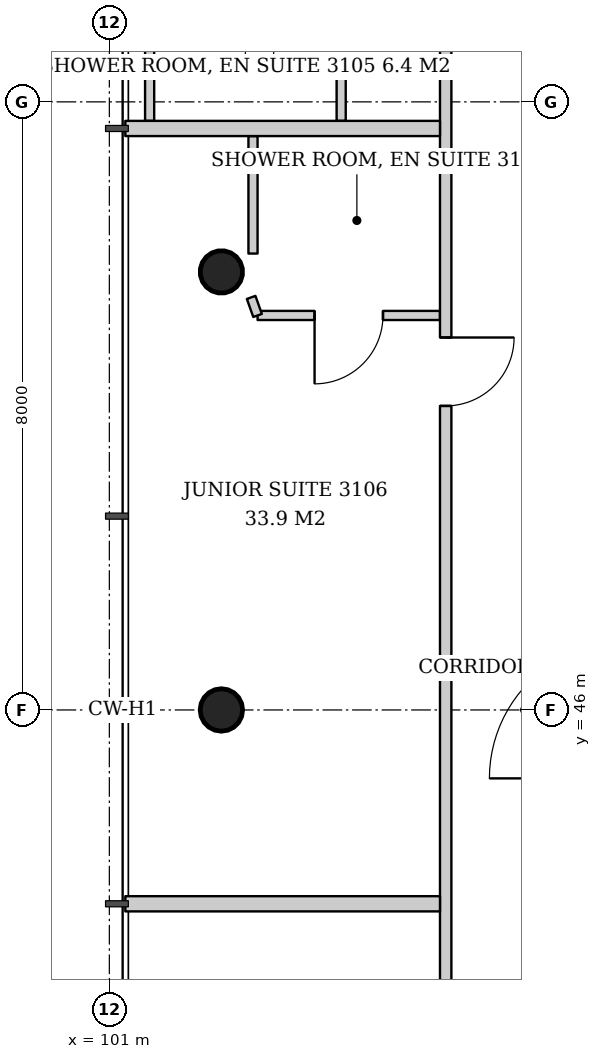
"""IFC4 building model, lengths in metres.
Left out: names, types, materials, properties, quantities, classifications, styles, units other than length and angle.
Written with IfcOpenShell. Run it as: python <this file> out.ifc"""

import sys

from ifc_helpers import new_model, si_unit, direction, frame, frame_2d, origin, origin_2d, place, context, subcontext, project, spatial, rectangle, hollow_circle, extrude, element, fill, save


model = new_model("IFC4")
c1 = context("Model", 3, precision=1e-05, world=origin(), true_north=direction((0.0, 1.0)))
c2 = subcontext(c1, "Body", "Model", "MODEL_VIEW")
j1 = project(units=[si_unit("LENGTHUNIT", "METRE"), si_unit("PLANEANGLEUNIT", "RADIAN")], contexts=[c1])
p1 = place(None, origin())
s1 = spatial("IfcSite", under=j1, at=p1, CompositionType="ELEMENT")
p2 = place(p1, origin())
s2 = spatial("IfcBuilding", under=s1, at=p2, CompositionType="ELEMENT")
p3 = place(p2, frame((0.0, 0.0, 123.6)))
s3 = spatial("IfcBuildingStorey", under=s2, at=p3, CompositionType="ELEMENT", Elevation=123.6)
p4 = place(p3, frame((102.422, 51.789, 0.0), z_axis=(0.043062285527, -0.021563230905, 0.998839660125), x_axis=(0.44774654769, 0.894160516368, 0.0)))
e1 = element("IfcColumn", 1, at=p4, inside=s3, PredefinedType="COLUMN", context=c2, shape_type="SweptSolid", body=[
    extrude(hollow_circle(Radius=0.28, WallThickness=0.02, at=origin_2d()), origin(), (0.0, 0.0, 1.0), 3.804),
])
p5 = place(p3, frame((102.422, 46.0, 0.0), z_axis=(0.043072300418, 0.0, 0.999071957837), x_axis=(0.0, 1.0, 0.0)))
e2 = element("IfcColumn", 2, at=p5, inside=s3, PredefinedType="COLUMN", context=c2, shape_type="SweptSolid", body=[
    extrude(hollow_circle(Radius=0.28, WallThickness=0.02, at=origin_2d()), origin(), (0.0, 0.0, 1.0), 3.803),
])
p6 = place(p3, frame((104.05, 53.75, 0.0), z_axis=(0.0, 0.0, 1.0), x_axis=(0.0, 1.0, 0.0)))
e3 = element("IfcWall", 3, at=p6, inside=s3, PredefinedType="PARTITIONING", context=c2, shape_type="SweptSolid", body=[
    extrude(rectangle(XDim=2.58, YDim=0.12, at=frame_2d((1.29, 0.0))), origin(), (0.0, 0.0, 1.0), 2.9),
])
p7 = place(p6, frame((0.75, 0.0, 0.0)))
e4 = element("IfcOpeningElement", 4, at=p7, cuts=e3, PredefinedType="OPENING", context=c2, shape_type="SweptSolid", body=[
    extrude(rectangle(XDim=0.9, YDim=2.1, at=frame_2d((0.45, 1.05))), frame((0.0, 0.07, 0.0), z_axis=(0.0, -1.0, 0.0), x_axis=(1.0, 0.0, 0.0)), (0.0, 0.0, 1.0), 0.14),
])
p8 = place(p3, frame((101.53, 53.75, 0.0), z_axis=(0.0, 0.0, 1.0), x_axis=(0.0, 1.0, 0.0)))
e5 = element("IfcWall", 5, at=p8, inside=s3, PredefinedType="PARTITIONING", context=c2, shape_type="SweptSolid", body=[
    extrude(rectangle(XDim=2.58, YDim=0.12, at=frame_2d((1.29, 0.0))), origin(), (0.0, 0.0, 1.0), 3.6),
])
p9 = place(p3, frame((102.89, 53.55, 0.0), z_axis=(0.0, 0.0, 1.0), x_axis=(0.0, -1.0, 0.0)))
e6 = element("IfcWall", 6, at=p9, inside=s3, PredefinedType="PARTITIONING", context=c2, shape_type="SweptSolid", body=[
    extrude(rectangle(XDim=1.546, YDim=0.12, at=frame_2d((0.773, 0.0))), origin(), (0.0, 0.0, 1.0), 3.6),
])
p10 = place(p3, frame((105.35, 51.19, 0.0), z_axis=(0.0, 0.0, 1.0), x_axis=(-1.0, 0.0, 0.0)))
e7 = element("IfcWall", 7, at=p10, inside=s3, PredefinedType="PARTITIONING", context=c2, shape_type="SweptSolid", body=[
    extrude(rectangle(XDim=2.4, YDim=0.12, at=frame_2d((1.2, 0.0))), origin(), (0.0, 0.0, 1.0), 2.65),
])
p11 = place(p10, frame((0.75, 0.0, 0.0)))
e8 = element("IfcOpeningElement", 8, at=p11, cuts=e7, PredefinedType="OPENING", context=c2, shape_type="SweptSolid", body=[
    extrude(rectangle(XDim=0.9, YDim=2.1, at=frame_2d((0.45, 1.05))), frame((0.0, 0.07, 0.0), z_axis=(0.0, -1.0, 0.0), x_axis=(1.0, 0.0, 0.0)), (0.0, 0.0, 1.0), 0.14),
])
p12 = place(p3, frame((105.425, 56.793, 0.0), z_axis=(0.0, 0.0, 1.0), x_axis=(0.0, -1.0, 0.0)))
e9 = element("IfcWall", 9, at=p12, inside=s3, PredefinedType="PARTITIONING", context=c2, shape_type="SweptSolid", body=[
    extrude(rectangle(XDim=21.586, YDim=0.15, at=frame_2d((10.793, 0.0))), origin(), (0.0, 0.0, 1.0), 2.9),
])
p13 = place(p12, frame((0.718, 0.0, 0.0)))
e10 = element("IfcOpeningElement", 10, at=p13, cuts=e9, PredefinedType="OPENING", context=c2, shape_type="SweptSolid", body=[
    extrude(rectangle(XDim=0.9, YDim=2.1, at=frame_2d((0.45, 1.05))), frame((0.0, 0.085, 0.0), z_axis=(0.0, -1.0, 0.0), x_axis=(1.0, 0.0, 0.0)), (0.0, 0.0, 1.0), 0.17),
])
p14 = place(p12, frame((5.893, 0.0, 0.0)))
e11 = element("IfcOpeningElement", 11, at=p14, cuts=e9, PredefinedType="OPENING", context=c2, shape_type="SweptSolid", body=[
    extrude(rectangle(XDim=0.9, YDim=2.1, at=frame_2d((0.45, 1.05))), frame((0.0, 0.085, 0.0), z_axis=(0.0, -1.0, 0.0), x_axis=(1.0, 0.0, 0.0)), (0.0, 0.0, 1.0), 0.17),
])
p15 = place(p12, frame((16.043, 0.0, 0.0)))
e12 = element("IfcOpeningElement", 12, at=p15, cuts=e9, PredefinedType="OPENING", context=c2, shape_type="SweptSolid", body=[
    extrude(rectangle(XDim=1.0, YDim=2.1, at=frame_2d((0.5, 1.05))), frame((0.0, 0.085, 0.0), z_axis=(0.0, -1.0, 0.0), x_axis=(1.0, 0.0, 0.0)), (0.0, 0.0, 1.0), 0.17),
])
p16 = place(p3, frame((105.35, 53.65, 0.0), z_axis=(0.0, 0.0, 1.0), x_axis=(-1.0, 0.0, 0.0)))
e13 = element("IfcWall", 13, at=p16, inside=s3, PredefinedType="PARTITIONING", context=c2, shape_type="SweptSolid", body=[
    extrude(rectangle(XDim=4.14, YDim=0.2, at=frame_2d((2.07, 0.0))), origin(), (0.0, 0.0, 1.0), 3.2),
])
p17 = place(p3, frame((105.35, 43.45, 0.0), z_axis=(0.0, 0.0, 1.0), x_axis=(-1.0, 0.0, 0.0)))
e14 = element("IfcWall", 14, at=p17, inside=s3, PredefinedType="PARTITIONING", context=c2, shape_type="SweptSolid", body=[
    extrude(rectangle(XDim=4.14, YDim=0.2, at=frame_2d((2.07, 0.0))), origin(), (0.0, 0.0, 1.0), 2.65),
])
p18 = place(p3, frame((102.95, 51.19, 0.0), z_axis=(0.0, 0.0, 1.0), x_axis=(-0.33418781393, 0.942506501315, 0.0)))
e15 = element("IfcWall", 15, at=p18, inside=s3, PredefinedType="PARTITIONING", context=c2, shape_type="SweptSolid", body=[
    extrude(rectangle(XDim=0.252, YDim=0.12, at=frame_2d((0.126, 0.0))), origin(), (0.0, 0.0, 1.0), 2.65),
])
p19 = place(p7, origin())
e16 = element("IfcDoor", 16, at=p19, inside=s3, OperationType="SINGLE_SWING_LEFT", PredefinedType="DOOR", context=c2, shape_type="SweptSolid", body=[
    extrude(rectangle(XDim=0.9, YDim=2.1, at=frame_2d((0.45, 1.05))), frame((0.0, 0.025, 0.0), z_axis=(0.0, -1.0, 0.0), x_axis=(1.0, 0.0, 0.0)), (0.0, 0.0, 1.0), 0.05),
])
fill(e4, e16)
p20 = place(p11, origin())
e17 = element("IfcDoor", 17, at=p20, inside=s3, OperationType="SINGLE_SWING_RIGHT", PredefinedType="DOOR", context=c2, shape_type="SweptSolid", body=[
    extrude(rectangle(XDim=0.9, YDim=2.1, at=frame_2d((0.45, 1.05))), frame((0.0, 0.025, 0.0), z_axis=(0.0, -1.0, 0.0), x_axis=(1.0, 0.0, 0.0)), (0.0, 0.0, 1.0), 0.05),
])
fill(e8, e17)
p21 = place(p14, origin())
e18 = element("IfcDoor", 18, at=p21, inside=s3, OperationType="SINGLE_SWING_LEFT", PredefinedType="DOOR", context=c2, shape_type="SweptSolid", body=[
    extrude(rectangle(XDim=0.9, YDim=2.1, at=frame_2d((0.45, 1.05))), frame((0.0, 0.025, 0.0), z_axis=(0.0, -1.0, 0.0), x_axis=(1.0, 0.0, 0.0)), (0.0, 0.0, 1.0), 0.05),
])
fill(e11, e18)
save(model, sys.argv[1])
